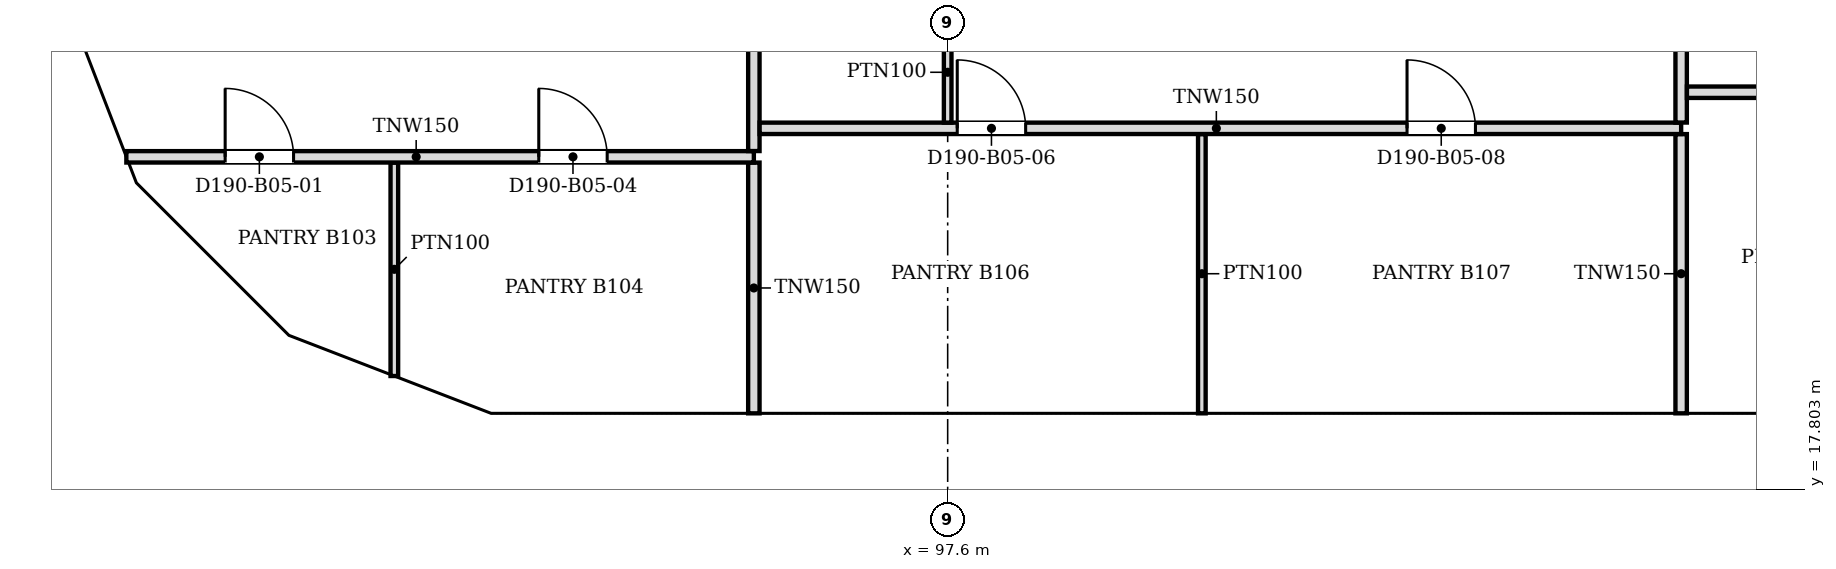
"""IFC4 building model, lengths in metres.
Left out: names, types, materials, properties, quantities, classifications, styles, units other than length and angle.
Written with IfcOpenShell. Run it as: python <this file> out.ifc"""

import sys

from ifc_helpers import new_model, si_unit, direction, frame, frame_2d, origin, place, context, subcontext, project, spatial, polyline, rectangle, outline, extrude, faceted_brep, source, transform, mapped, element, fill, save


model = new_model("IFC4")
c1 = context("Model", 3, precision=1e-05, world=origin(), true_north=direction((0.0, 1.0)))
c2 = subcontext(c1, "Body", "Model", "MODEL_VIEW")
j1 = project(units=[si_unit("LENGTHUNIT", "METRE"), si_unit("PLANEANGLEUNIT", "RADIAN")], contexts=[c1])
p1 = place(None, origin())
s1 = spatial("IfcSite", under=j1, at=p1, CompositionType="ELEMENT")
p2 = place(p1, origin())
s2 = spatial("IfcBuilding", under=s1, at=p2, CompositionType="ELEMENT")
p3 = place(p2, frame((0.0, 0.0, 48.6)))
s3 = spatial("IfcBuildingStorey", under=s2, at=p3, CompositionType="ELEMENT", Elevation=48.6)
m1 = source(origin(), c2, "Body", "Brep", [
    faceted_brep([(0.047, -0.25, 0.0), (3.05, -0.25, 3.8), (0.047, -0.25, 7.6), (0.0, -0.25, 7.54), (0.0, -0.25, 0.06), (0.093, 0.25, 7.541), (3.05, 0.25, 3.8), (0.093, 0.25, 0.059), (0.047, 0.0, 0.0), (0.047, 0.0, 7.6)], [[[0, 1, 2, 3, 4]], [[5, 6, 7]], [[7, 6, 1, 0, 8]], [[6, 5, 9, 2, 1]], [[3, 2, 9]], [[8, 0, 4]], [[7, 8, 4, 3, 9, 5]]]),
])
p4 = place(p3, frame((91.5, 18.55, -3.8), z_axis=(0.0, 0.0, 1.0), x_axis=(1.0, 0.0, 0.0)))
e1 = element("IfcWall", 1, at=p4, inside=s3, PredefinedType="SOLIDWALL", context=c2, shape_type="MappedRepresentation", body=[
    mapped(m1, transform((0.0, 0.0, 0.0), scale=1.0)),
])
m2 = source(origin(), c2, "Body", "SweptSolid", [
    extrude(outline(polyline([(0.247, 0.656), (2.731, 3.8), (0.247, 6.944), (0.247, 0.656)])), frame((0.0, 0.26, 0.0), z_axis=(0.0, -1.0, 0.0), x_axis=(1.0, 0.0, 0.0)), (0.0, 0.0, 1.0), 0.52),
])
p5 = place(p4, origin())
e2 = element("IfcOpeningElement", 2, at=p5, cuts=e1, PredefinedType="OPENING", context=c2, shape_type="MappedRepresentation", body=[
    mapped(m2, transform((0.0, 0.0, 0.0), scale=1.0)),
])
m3 = source(origin(), c2, "Body", "Brep", [
    faceted_brep([(2.95, -0.25, 0.0), (2.997, -0.25, 0.059), (2.997, -0.25, 7.541), (2.95, -0.25, 7.6), (0.0, -0.25, 3.8), (0.053, 0.25, 3.868), (2.904, 0.25, 7.54), (2.904, 0.25, 0.06), (0.053, 0.25, 3.732), (2.95, 0.0, 0.0), (2.95, 0.0, 7.6), (0.0, 0.0, 3.8)], [[[0, 1, 2, 3, 4]], [[5, 6, 7, 8]], [[1, 0, 9]], [[10, 3, 2]], [[6, 5, 11, 4, 3, 10]], [[8, 7, 9, 0, 4, 11]], [[8, 11, 5]], [[1, 9, 7, 6, 10, 2]]]),
])
p6 = place(p3, frame((88.794, 19.612, -3.8), z_axis=(0.0, 0.0, 1.0), x_axis=(0.933000876937, -0.359874094142, 0.0)))
e3 = element("IfcWall", 3, at=p6, inside=s3, PredefinedType="SOLIDWALL", context=c2, shape_type="MappedRepresentation", body=[
    mapped(m3, transform((0.0, 0.0, 0.0), scale=1.0)),
])
m4 = source(origin(), c2, "Body", "SweptSolid", [
    extrude(outline(polyline([(2.75, 6.935), (0.316, 3.8), (2.75, 0.665), (2.75, 6.935)])), frame((0.0, 0.26, 0.0), z_axis=(0.0, -1.0, 0.0), x_axis=(1.0, 0.0, 0.0)), (0.0, 0.0, 1.0), 0.52),
])
p7 = place(p6, origin())
e4 = element("IfcOpeningElement", 4, at=p7, cuts=e3, PredefinedType="OPENING", context=c2, shape_type="MappedRepresentation", body=[
    mapped(m4, transform((0.0, 0.0, 0.0), scale=1.0)),
])
m5 = source(origin(), c2, "Body", "Brep", [
    faceted_brep([(3.05, -0.25, 0.0), (6.1, -0.25, 3.8), (6.1, -0.25, 3.8), (3.05, -0.25, 7.6), (0.0, -0.25, 3.8), (0.0, 0.25, 3.8), (3.05, 0.25, 7.6), (6.1, 0.25, 3.8), (6.1, 0.25, 3.8), (3.05, 0.25, 0.0)], [[[0, 1, 2, 3, 4]], [[5, 6, 7, 8, 9]], [[9, 8, 1, 0]], [[7, 6, 3, 2]], [[6, 5, 4, 3]], [[5, 9, 0, 4]], [[1, 8, 7, 2]]]),
])
p8 = place(p3, frame((94.55, 18.55, -3.8), z_axis=(0.0, 0.0, 1.0), x_axis=(1.0, 0.0, 0.0)))
e5 = element("IfcWall", 5, at=p8, inside=s3, PredefinedType="SOLIDWALL", context=c2, shape_type="MappedRepresentation", body=[
    mapped(m5, transform((0.0, 0.0, 0.0), scale=1.0)),
])
m6 = source(origin(), c2, "Body", "SweptSolid", [
    extrude(outline(polyline([(3.05, 0.399), (5.78, 3.8), (3.05, 7.2), (0.321, 3.8), (3.05, 0.399)])), frame((0.0, 0.26, 0.0), z_axis=(0.0, -1.0, 0.0), x_axis=(1.0, 0.0, 0.0)), (0.0, 0.0, 1.0), 0.52),
])
p9 = place(p8, origin())
e6 = element("IfcOpeningElement", 6, at=p9, cuts=e5, PredefinedType="OPENING", context=c2, shape_type="MappedRepresentation", body=[
    mapped(m6, transform((0.0, 0.0, 0.0), scale=1.0)),
])
m7 = source(origin(), c2, "Body", "SweptSolid", [
    extrude(outline(polyline([(3.05, 0.0), (6.1, 3.8), (3.05, 7.6), (0.0, 3.8), (3.05, 0.0)])), frame((0.0, 0.25, 0.0), z_axis=(0.0, -1.0, 0.0), x_axis=(1.0, 0.0, 0.0)), (0.0, 0.0, 1.0), 0.5),
])
p10 = place(p3, frame((100.65, 18.55, -3.8), z_axis=(0.0, 0.0, 1.0), x_axis=(1.0, 0.0, 0.0)))
e7 = element("IfcWall", 7, at=p10, inside=s3, PredefinedType="SOLIDWALL", context=c2, shape_type="MappedRepresentation", body=[
    mapped(m7, transform((0.0, 0.0, 0.0), scale=1.0)),
])
p11 = place(p10, origin())
e8 = element("IfcOpeningElement", 8, at=p11, cuts=e7, PredefinedType="OPENING", context=c2, shape_type="MappedRepresentation", body=[
    mapped(m6, transform((0.0, 0.0, 0.0), scale=1.0)),
])
p12 = place(p3, frame((106.75, 18.55, -3.8), z_axis=(0.0, 0.0, 1.0), x_axis=(1.0, 0.0, 0.0)))
e9 = element("IfcWall", 9, at=p12, inside=s3, PredefinedType="SOLIDWALL", context=c2, shape_type="MappedRepresentation", body=[
    mapped(m7, transform((0.0, 0.0, 0.0), scale=1.0)),
])
p13 = place(p12, origin())
e10 = element("IfcOpeningElement", 10, at=p13, cuts=e9, PredefinedType="OPENING", context=c2, shape_type="MappedRepresentation", body=[
    mapped(m6, transform((0.0, 0.0, 0.0), scale=1.0)),
])
m8 = source(origin(), c2, "Body", "Brep", [
    faceted_brep([(2.95, -0.25, 0.0), (3.003, -0.25, 0.068), (3.003, -0.25, 7.531), (2.95, -0.25, 7.6), (0.0, -0.25, 3.8), (0.047, 0.25, 3.86), (2.898, 0.25, 7.532), (2.898, 0.25, 0.068), (0.047, 0.25, 3.74), (2.95, 0.0, 0.0), (2.95, 0.0, 7.6), (0.0, 0.0, 3.8)], [[[0, 1, 2, 3, 4]], [[5, 6, 7, 8]], [[1, 0, 9]], [[10, 3, 2]], [[6, 5, 11, 4, 3, 10]], [[8, 7, 9, 0, 4, 11]], [[8, 11, 5]], [[1, 9, 7, 6, 10, 2]]]),
])
p14 = place(p3, frame((85.65, 24.447, -3.8), z_axis=(0.0, 0.0, 1.0), x_axis=(0.35992665181, -0.932980602862, 0.0)))
e11 = element("IfcWall", 11, at=p14, inside=s3, PredefinedType="SOLIDWALL", context=c2, shape_type="MappedRepresentation", body=[
    mapped(m8, transform((0.0, 0.0, 0.0), scale=1.0)),
])
p15 = place(p14, origin())
e12 = element("IfcOpeningElement", 12, at=p15, cuts=e11, PredefinedType="OPENING", context=c2, shape_type="MappedRepresentation", body=[
    mapped(m4, transform((0.0, 0.0, 0.0), scale=1.0)),
])
m9 = source(origin(), c2, "Body", "Brep", [
    faceted_brep([(0.053, -0.25, 0.0), (2.997, -0.25, 3.8), (0.053, -0.25, 7.6), (0.0, -0.25, 7.532), (0.0, -0.25, 0.068), (0.106, 0.25, 7.531), (2.944, 0.25, 3.868), (2.944, 0.25, 3.732), (0.106, 0.25, 0.068), (2.997, 0.0, 3.8), (0.053, 0.0, 0.0), (0.053, 0.0, 7.6)], [[[0, 1, 2, 3, 4]], [[5, 6, 7, 8]], [[8, 7, 9, 1, 0, 10]], [[6, 5, 11, 2, 1, 9]], [[3, 2, 11]], [[10, 0, 4]], [[8, 10, 4, 3, 11, 5]], [[7, 6, 9]]]),
])
p16 = place(p3, frame((86.675, 21.731, -3.8), z_axis=(0.0, 0.0, 1.0), x_axis=(0.707106781187, -0.707106781187, 0.0)))
e13 = element("IfcWall", 13, at=p16, inside=s3, PredefinedType="SOLIDWALL", context=c2, shape_type="MappedRepresentation", body=[
    mapped(m9, transform((0.0, 0.0, 0.0), scale=1.0)),
])
m10 = source(origin(), c2, "Body", "SweptSolid", [
    extrude(outline(polyline([(0.253, 0.666), (2.681, 3.8), (0.253, 6.934), (0.253, 0.666)])), frame((0.0, 0.26, 0.0), z_axis=(0.0, -1.0, 0.0), x_axis=(1.0, 0.0, 0.0)), (0.0, 0.0, 1.0), 0.52),
])
p17 = place(p16, origin())
e14 = element("IfcOpeningElement", 14, at=p17, cuts=e13, PredefinedType="OPENING", context=c2, shape_type="MappedRepresentation", body=[
    mapped(m10, transform((0.0, 0.0, 0.0), scale=1.0)),
])
p18 = place(p2, frame((0.0, 0.0, 52.4)))
s4 = spatial("IfcBuildingStorey", under=s2, at=p18, CompositionType="ELEMENT", Elevation=52.4)
m11 = source(origin(), c2, "Body", "Brep", [
    faceted_brep([(3.003, -0.25, 0.0), (6.053, -0.25, 3.8), (3.003, -0.25, 7.6), (0.0, -0.25, 3.8), (0.047, 0.25, 3.859), (3.003, 0.25, 7.6), (6.053, 0.25, 3.8), (3.003, 0.25, 0.0), (0.047, 0.25, 3.741), (0.0, 0.0, 3.8)], [[[0, 1, 2, 3]], [[4, 5, 6, 7, 8]], [[7, 6, 1, 0]], [[6, 5, 2, 1]], [[5, 4, 9, 3, 2]], [[8, 7, 0, 3, 9]], [[8, 9, 4]]]),
])
p19 = place(p18, frame((91.547, 18.55, -3.8), z_axis=(0.0, 0.0, 1.0), x_axis=(1.0, 0.0, 0.0)))
e15 = element("IfcWall", 15, at=p19, inside=s4, PredefinedType="SOLIDWALL", context=c2, shape_type="MappedRepresentation", body=[
    mapped(m11, transform((0.0, 0.0, 0.0), scale=1.0)),
])
m12 = source(origin(), c2, "Body", "SweptSolid", [
    extrude(outline(polyline([(3.005, 0.401), (5.733, 3.8), (3.005, 7.199), (0.319, 3.8), (3.005, 0.401)])), frame((0.0, 0.26, 0.0), z_axis=(0.0, -1.0, 0.0), x_axis=(1.0, 0.0, 0.0)), (0.0, 0.0, 1.0), 0.52),
])
p20 = place(p19, origin())
e16 = element("IfcOpeningElement", 16, at=p20, cuts=e15, PredefinedType="OPENING", context=c2, shape_type="MappedRepresentation", body=[
    mapped(m12, transform((0.0, 0.0, 0.0), scale=1.0)),
])
m13 = source(origin(), c2, "Body", "Brep", [
    faceted_brep([(3.05, -0.25, 0.0), (6.1, -0.25, 3.8), (6.1, -0.25, 3.8), (3.05, -0.25, 7.6), (0.0, -0.25, 3.8), (0.0, 0.25, 3.8), (3.05, 0.25, 7.6), (6.1, 0.25, 3.8), (6.1, 0.25, 3.8), (3.05, 0.25, 0.0)], [[[0, 1, 2, 3, 4]], [[5, 6, 7, 8, 9]], [[9, 8, 1, 0]], [[7, 6, 3, 2]], [[6, 5, 4, 3]], [[5, 9, 0, 4]], [[1, 8, 7, 2]]]),
])
p21 = place(p18, frame((97.6, 18.55, -3.8), z_axis=(0.0, 0.0, 1.0), x_axis=(1.0, 0.0, 0.0)))
e17 = element("IfcWall", 17, at=p21, inside=s4, PredefinedType="SOLIDWALL", context=c2, shape_type="MappedRepresentation", body=[
    mapped(m13, transform((0.0, 0.0, 0.0), scale=1.0)),
])
m14 = source(origin(), c2, "Body", "SweptSolid", [
    extrude(outline(polyline([(3.05, 0.399), (5.78, 3.8), (3.05, 7.2), (0.321, 3.8), (3.05, 0.399)])), frame((0.0, 0.26, 0.0), z_axis=(0.0, -1.0, 0.0), x_axis=(1.0, 0.0, 0.0)), (0.0, 0.0, 1.0), 0.52),
])
p22 = place(p21, origin())
e18 = element("IfcOpeningElement", 18, at=p22, cuts=e17, PredefinedType="OPENING", context=c2, shape_type="MappedRepresentation", body=[
    mapped(m14, transform((0.0, 0.0, 0.0), scale=1.0)),
])
m15 = source(origin(), c2, "Body", "SweptSolid", [
    extrude(outline(polyline([(3.05, 0.0), (6.1, 3.8), (3.05, 7.6), (0.0, 3.8), (3.05, 0.0)])), frame((0.0, 0.25, 0.0), z_axis=(0.0, -1.0, 0.0), x_axis=(1.0, 0.0, 0.0)), (0.0, 0.0, 1.0), 0.5),
])
p23 = place(p18, frame((103.7, 18.55, -3.8), z_axis=(0.0, 0.0, 1.0), x_axis=(1.0, 0.0, 0.0)))
e19 = element("IfcWall", 19, at=p23, inside=s4, PredefinedType="SOLIDWALL", context=c2, shape_type="MappedRepresentation", body=[
    mapped(m15, transform((0.0, 0.0, 0.0), scale=1.0)),
])
p24 = place(p23, origin())
e20 = element("IfcOpeningElement", 20, at=p24, cuts=e19, PredefinedType="OPENING", context=c2, shape_type="MappedRepresentation", body=[
    mapped(m14, transform((0.0, 0.0, 0.0), scale=1.0)),
])
m16 = source(origin(), c2, "Body", "Brep", [
    faceted_brep([(0.047, -0.25, 0.0), (2.997, -0.25, 3.8), (0.047, -0.25, 7.6), (0.0, -0.25, 7.541), (0.0, -0.25, 0.059), (0.093, 0.25, 7.54), (2.944, 0.25, 3.868), (2.944, 0.25, 3.732), (0.093, 0.25, 0.06), (2.997, 0.0, 3.8), (0.047, 0.0, 0.0), (0.047, 0.0, 7.6)], [[[0, 1, 2, 3, 4]], [[5, 6, 7, 8]], [[8, 7, 9, 1, 0, 10]], [[6, 5, 11, 2, 1, 9]], [[3, 2, 11]], [[10, 0, 4]], [[8, 10, 4, 3, 11, 5]], [[9, 7, 6]]]),
])
p25 = place(p18, frame((85.633, 24.49, -3.8), z_axis=(0.0, 0.0, 1.0), x_axis=(0.359901446078, -0.932990326376, 0.0)))
e21 = element("IfcWall", 21, at=p25, inside=s4, PredefinedType="SOLIDWALL", context=c2, shape_type="MappedRepresentation", body=[
    mapped(m16, transform((0.0, 0.0, 0.0), scale=1.0)),
])
m17 = source(origin(), c2, "Body", "SweptSolid", [
    extrude(outline(polyline([(0.247, 0.665), (2.681, 3.8), (0.247, 6.935), (0.247, 0.665)])), frame((0.0, 0.26, 0.0), z_axis=(0.0, -1.0, 0.0), x_axis=(1.0, 0.0, 0.0)), (0.0, 0.0, 1.0), 0.52),
])
p26 = place(p25, origin())
e22 = element("IfcOpeningElement", 22, at=p26, cuts=e21, PredefinedType="OPENING", context=c2, shape_type="MappedRepresentation", body=[
    mapped(m17, transform((0.0, 0.0, 0.0), scale=1.0)),
])
m18 = source(origin(), c2, "Body", "Brep", [
    faceted_brep([(2.944, -0.25, 0.0), (2.997, -0.25, 0.068), (2.997, -0.25, 7.532), (2.944, -0.25, 7.6), (0.0, -0.25, 3.8), (0.053, 0.25, 3.868), (2.891, 0.25, 7.532), (2.891, 0.25, 0.068), (0.053, 0.25, 3.731), (2.944, 0.0, 0.0), (2.944, 0.0, 7.6), (0.0, 0.0, 3.8)], [[[0, 1, 2, 3, 4]], [[5, 6, 7, 8]], [[1, 0, 9]], [[10, 3, 2]], [[6, 5, 11, 4, 3, 10]], [[8, 7, 9, 0, 4, 11]], [[8, 11, 5]], [[1, 9, 7, 6, 10, 2]]]),
])
p27 = place(p18, frame((86.712, 21.694, -3.8), z_axis=(0.0, 0.0, 1.0), x_axis=(0.707066050402, -0.707147509625, 0.0)))
e23 = element("IfcWall", 23, at=p27, inside=s4, PredefinedType="SOLIDWALL", context=c2, shape_type="MappedRepresentation", body=[
    mapped(m18, transform((0.0, 0.0, 0.0), scale=1.0)),
])
m19 = source(origin(), c2, "Body", "SweptSolid", [
    extrude(outline(polyline([(2.744, 6.934), (0.316, 3.8), (2.744, 0.666), (2.744, 6.934)])), frame((0.0, 0.26, 0.0), z_axis=(0.0, -1.0, 0.0), x_axis=(1.0, 0.0, 0.0)), (0.0, 0.0, 1.0), 0.52),
])
p28 = place(p27, origin())
e24 = element("IfcOpeningElement", 24, at=p28, cuts=e23, PredefinedType="OPENING", context=c2, shape_type="MappedRepresentation", body=[
    mapped(m19, transform((0.0, 0.0, 0.0), scale=1.0)),
])
m20 = source(origin(), c2, "Body", "Brep", [
    faceted_brep([(0.053, -0.25, 0.0), (3.003, -0.25, 3.8), (0.053, -0.25, 7.6), (0.0, -0.25, 7.531), (0.0, -0.25, 0.068), (0.106, 0.25, 7.532), (2.957, 0.25, 3.86), (2.957, 0.25, 3.74), (0.106, 0.25, 0.068), (3.003, 0.0, 3.8), (0.053, 0.0, 0.0), (0.053, 0.0, 7.6)], [[[0, 1, 2, 3, 4]], [[5, 6, 7, 8]], [[8, 7, 9, 1, 0, 10]], [[6, 5, 11, 2, 1, 9]], [[3, 2, 11]], [[10, 0, 4]], [[8, 10, 4, 3, 11, 5]], [[9, 7, 6]]]),
])
p29 = place(p18, frame((88.744, 19.631, -3.8), z_axis=(0.0, 0.0, 1.0), x_axis=(0.932997369089, -0.359883188373, 0.0)))
e25 = element("IfcWall", 25, at=p29, inside=s4, PredefinedType="SOLIDWALL", context=c2, shape_type="MappedRepresentation", body=[
    mapped(m20, transform((0.0, 0.0, 0.0), scale=1.0)),
])
m21 = source(origin(), c2, "Body", "SweptSolid", [
    extrude(outline(polyline([(0.253, 0.665), (2.687, 3.8), (0.253, 6.935), (0.253, 0.665)])), frame((0.0, 0.26, 0.0), z_axis=(0.0, -1.0, 0.0), x_axis=(1.0, 0.0, 0.0)), (0.0, 0.0, 1.0), 0.52),
])
p30 = place(p29, origin())
e26 = element("IfcOpeningElement", 26, at=p30, cuts=e25, PredefinedType="OPENING", context=c2, shape_type="MappedRepresentation", body=[
    mapped(m21, transform((0.0, 0.0, 0.0), scale=1.0)),
])
p31 = place(p3, frame((95.05, 18.8, 0.0), z_axis=(0.0, 0.0, 1.0), x_axis=(0.0, 1.0, 0.0)))
e27 = element("IfcWall", 27, at=p31, inside=s3, PredefinedType="PARTITIONING", context=c2, shape_type="SweptSolid", body=[
    extrude(rectangle(XDim=3.299, YDim=0.15, at=frame_2d((1.649, 0.0))), origin(), (0.0, 0.0, 1.0), 3.067),
])
p32 = place(p3, frame((100.944, 18.8, 0.0), z_axis=(0.0, 0.0, 1.0), x_axis=(0.0, 1.0, 0.0)))
e28 = element("IfcWall", 28, at=p32, inside=s3, PredefinedType="PARTITIONING", context=c2, shape_type="SweptSolid", body=[
    extrude(rectangle(XDim=3.674, YDim=0.1, at=frame_2d((1.837, 0.0))), origin(), (0.0, 0.0, 1.0), 3.067),
])
p33 = place(p3, frame((107.25, 18.8, 0.0), z_axis=(0.0, 0.0, 1.0), x_axis=(0.0, 1.0, 0.0)))
e29 = element("IfcWall", 29, at=p33, inside=s3, PredefinedType="PARTITIONING", context=c2, shape_type="SweptSolid", body=[
    extrude(rectangle(XDim=3.674, YDim=0.15, at=frame_2d((1.837, 0.0))), origin(), (0.0, 0.0, 1.0), 3.067),
])
p34 = place(p3, frame((90.32, 19.291, 0.0), z_axis=(0.0, 0.0, 1.0), x_axis=(0.0, 1.0, 0.0)))
e30 = element("IfcWall", 30, at=p34, inside=s3, PredefinedType="PARTITIONING", context=c2, shape_type="SweptSolid", body=[
    extrude(rectangle(XDim=2.808, YDim=0.1, at=frame_2d((1.404, 0.0))), origin(), (0.0, 0.0, 1.0), 3.067),
])
p35 = place(p3, frame((95.05, 22.175, 0.0), z_axis=(0.0, 0.0, 1.0), x_axis=(-1.0, 0.0, 0.0)))
e31 = element("IfcWall", 31, at=p35, inside=s3, PredefinedType="PARTITIONING", context=c2, shape_type="SweptSolid", body=[
    extrude(rectangle(XDim=8.256, YDim=0.15, at=frame_2d((4.128, 0.0))), origin(), (0.0, 0.0, 1.0), 3.067),
])
m22 = source(origin(), c2, "Body", "SweptSolid", [
    extrude(rectangle(XDim=0.9, YDim=2.1, at=frame_2d((0.45, 1.05))), frame((0.0, 0.085, 0.0), z_axis=(0.0, -1.0, 0.0), x_axis=(1.0, 0.0, 0.0)), (0.0, 0.0, 1.0), 0.17),
])
p36 = place(p35, frame((6.056, 0.0, 0.0)))
e32 = element("IfcOpeningElement", 32, at=p36, cuts=e31, PredefinedType="OPENING", context=c2, shape_type="MappedRepresentation", body=[
    mapped(m22, transform((0.0, 0.0, 0.0), scale=1.0)),
])
p37 = place(p35, frame((1.93, 0.0, 0.0)))
e33 = element("IfcOpeningElement", 33, at=p37, cuts=e31, PredefinedType="OPENING", context=c2, shape_type="MappedRepresentation", body=[
    mapped(m22, transform((0.0, 0.0, 0.0), scale=1.0)),
])
p38 = place(p3, frame((95.05, 22.251, 0.0), z_axis=(0.0, 0.0, 1.0), x_axis=(0.0, 1.0, 0.0)))
e34 = element("IfcWall", 34, at=p38, inside=s3, PredefinedType="PARTITIONING", context=c2, shape_type="SweptSolid", body=[
    extrude(rectangle(XDim=12.273, YDim=0.15, at=frame_2d((6.136, 0.0))), origin(), (0.0, 0.0, 1.0), 3.067),
])
p39 = place(p3, frame((107.25, 22.55, 0.0), z_axis=(0.0, 0.0, 1.0), x_axis=(-1.0, 0.0, 0.0)))
e35 = element("IfcWall", 35, at=p39, inside=s3, PredefinedType="PARTITIONING", context=c2, shape_type="SweptSolid", body=[
    extrude(rectangle(XDim=12.124, YDim=0.15, at=frame_2d((6.062, 0.0))), origin(), (0.0, 0.0, 1.0), 3.067),
])
p40 = place(p39, frame((8.624, 0.0, 0.0)))
e36 = element("IfcOpeningElement", 36, at=p40, cuts=e35, PredefinedType="OPENING", context=c2, shape_type="MappedRepresentation", body=[
    mapped(m22, transform((0.0, 0.0, 0.0), scale=1.0)),
])
p41 = place(p39, frame((2.706, 0.0, 0.0)))
e37 = element("IfcOpeningElement", 37, at=p41, cuts=e35, PredefinedType="OPENING", context=c2, shape_type="MappedRepresentation", body=[
    mapped(m22, transform((0.0, 0.0, 0.0), scale=1.0)),
])
p42 = place(p3, frame((107.25, 22.626, 0.0), z_axis=(0.0, 0.0, 1.0), x_axis=(0.0, 1.0, 0.0)))
e38 = element("IfcWall", 38, at=p42, inside=s3, PredefinedType="PARTITIONING", context=c2, shape_type="SweptSolid", body=[
    extrude(rectangle(XDim=11.898, YDim=0.15, at=frame_2d((5.949, 0.0))), origin(), (0.0, 0.0, 1.0), 3.067),
])
p43 = place(p3, frame((116.4, 23.025, 0.0), z_axis=(0.0, 0.0, 1.0), x_axis=(-1.0, 0.0, 0.0)))
e39 = element("IfcWall", 39, at=p43, inside=s3, PredefinedType="PARTITIONING", context=c2, shape_type="SweptSolid", body=[
    extrude(rectangle(XDim=9.074, YDim=0.15, at=frame_2d((4.537, 0.0))), origin(), (0.0, 0.0, 1.0), 3.067),
])
p44 = place(p43, frame((7.074, 0.0, 0.0)))
e40 = element("IfcOpeningElement", 40, at=p44, cuts=e39, PredefinedType="OPENING", context=c2, shape_type="MappedRepresentation", body=[
    mapped(m22, transform((0.0, 0.0, 0.0), scale=1.0)),
])
p45 = place(p43, frame((1.93, 0.0, 0.0)))
e41 = element("IfcOpeningElement", 41, at=p45, cuts=e39, PredefinedType="OPENING", context=c2, shape_type="MappedRepresentation", body=[
    mapped(m22, transform((0.0, 0.0, 0.0), scale=1.0)),
])
p46 = place(p3, frame((97.6, 23.95, 0.0), z_axis=(0.0, 0.0, 1.0), x_axis=(0.0, -1.0, 0.0)))
e42 = element("IfcWall", 42, at=p46, inside=s3, PredefinedType="PARTITIONING", context=c2, shape_type="SweptSolid", body=[
    extrude(rectangle(XDim=1.325, YDim=0.1, at=frame_2d((0.663, 0.0))), origin(), (0.0, 0.0, 1.0), 3.067),
])
m23 = source(origin(), c2, "Body", "SweptSolid", [
    extrude(rectangle(XDim=0.9, YDim=2.1, at=frame_2d((0.45, 1.05))), frame((0.0, 0.025, 0.0), z_axis=(0.0, -1.0, 0.0), x_axis=(1.0, 0.0, 0.0)), (0.0, 0.0, 1.0), 0.05),
])
p47 = place(p36, origin())
e43 = element("IfcDoor", 43, at=p47, inside=s3, OperationType="SINGLE_SWING_RIGHT", PredefinedType="DOOR", context=c2, shape_type="MappedRepresentation", body=[
    mapped(m23, transform((0.0, 0.0, 0.0), scale=1.0)),
])
fill(e32, e43)
p48 = place(p37, origin())
e44 = element("IfcDoor", 44, at=p48, inside=s3, OperationType="SINGLE_SWING_RIGHT", PredefinedType="DOOR", context=c2, shape_type="MappedRepresentation", body=[
    mapped(m23, transform((0.0, 0.0, 0.0), scale=1.0)),
])
fill(e33, e44)
p49 = place(p40, origin())
e45 = element("IfcDoor", 45, at=p49, inside=s3, OperationType="SINGLE_SWING_RIGHT", PredefinedType="DOOR", context=c2, shape_type="MappedRepresentation", body=[
    mapped(m23, transform((0.0, 0.0, 0.0), scale=1.0)),
])
fill(e36, e45)
p50 = place(p41, origin())
e46 = element("IfcDoor", 46, at=p50, inside=s3, OperationType="SINGLE_SWING_RIGHT", PredefinedType="DOOR", context=c2, shape_type="MappedRepresentation", body=[
    mapped(m23, transform((0.0, 0.0, 0.0), scale=1.0)),
])
fill(e37, e46)
save(model, sys.argv[1])
